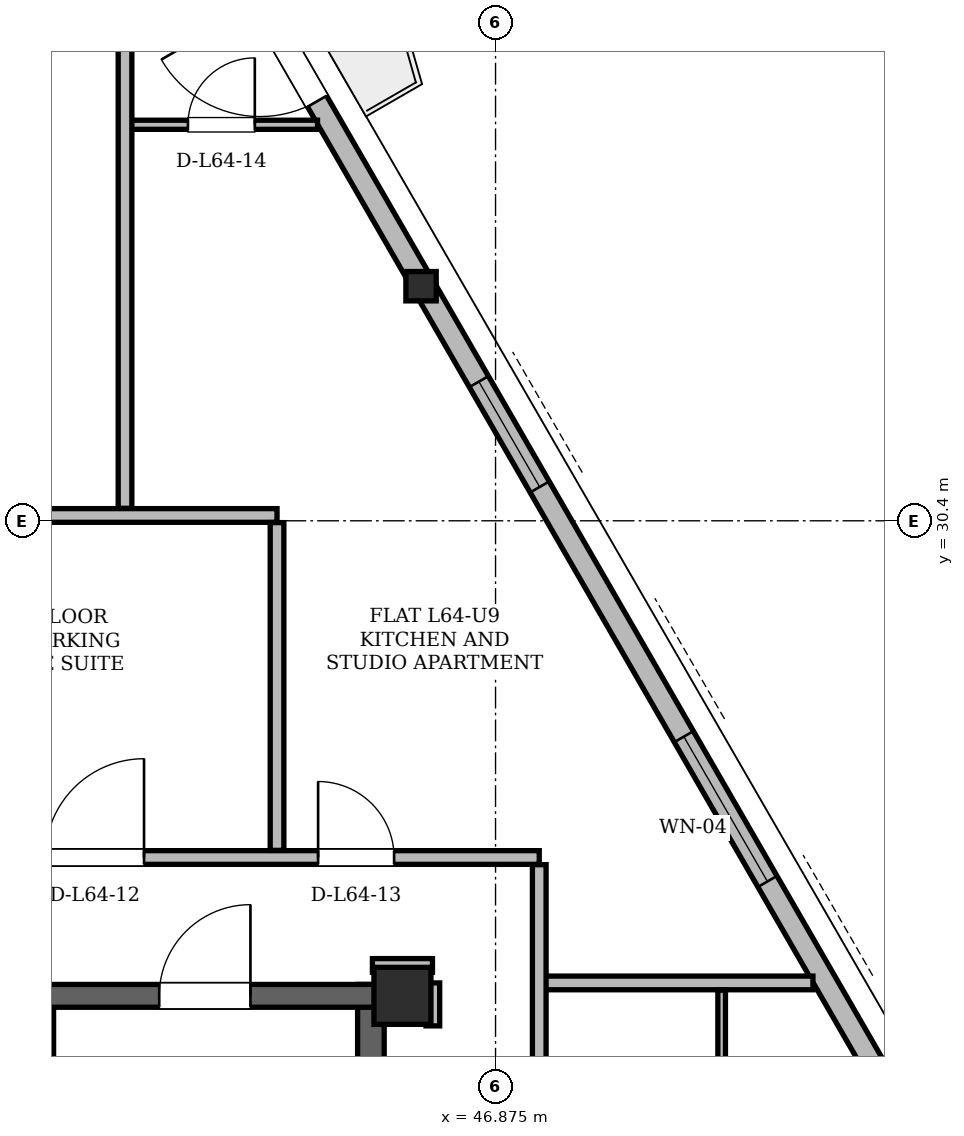
"""IFC4 building model, lengths in metres.
Left out: names, types, materials, properties, quantities, classifications, styles, units other than length and angle.
Written with IfcOpenShell. Run it as: python <this file> out.ifc"""

import sys

from ifc_helpers import new_model, si_unit, direction, frame, frame_2d, origin, origin_2d, place, context, subcontext, project, spatial, rectangle, hollow_rectangle, i_section, extrude, element, fill, save


model = new_model("IFC4")
c1 = context("Model", 3, precision=1e-05, world=origin(), true_north=direction((0.0, 1.0)))
c2 = subcontext(c1, "Body", "Model", "MODEL_VIEW")
j1 = project(units=[si_unit("LENGTHUNIT", "METRE"), si_unit("PLANEANGLEUNIT", "RADIAN")], contexts=[c1])
p1 = place(None, origin())
s1 = spatial("IfcSite", under=j1, at=p1, CompositionType="ELEMENT")
p2 = place(p1, origin())
s2 = spatial("IfcBuilding", under=s1, at=p2, CompositionType="ELEMENT")
p3 = place(p2, frame((0.0, 0.0, 241.5)))
s3 = spatial("IfcBuildingStorey", under=s2, at=p3, CompositionType="ELEMENT", Elevation=241.5)
p4 = place(p3, frame((45.65, 24.15, 0.0), z_axis=(0.0, 0.0, 1.0), x_axis=(1.0, 0.0, 0.0)))
e1 = element("IfcColumn", 1, at=p4, inside=s3, PredefinedType="COLUMN", context=c2, shape_type="SweptSolid", body=[
    extrude(hollow_rectangle(XDim=0.75, YDim=0.75, WallThickness=0.06, at=origin_2d()), origin(), (0.0, 0.0, 1.0), 3.6),
])
p5 = place(p3, frame((45.925, 33.498, 0.004), z_axis=(-0.016585869897, -0.006321663526, 0.999842460336), x_axis=(0.356154573909, -0.934427054127, 0.0)))
e2 = element("IfcColumn", 2, at=p5, inside=s3, PredefinedType="COLUMN", context=c2, shape_type="SweptSolid", body=[
    extrude(i_section(OverallWidth=0.399, OverallDepth=0.386, WebThickness=0.021, FlangeThickness=0.033, at=origin_2d()), origin(), (0.0, 0.0, 1.0), 3.592),
])
p6 = place(p3, frame((45.235, 11.0, 0.0), z_axis=(0.0, 0.0, 1.0), x_axis=(0.0, 1.0, 0.0)))
e3 = element("IfcWall", 3, at=p6, inside=s3, PredefinedType="SHEAR", context=c2, shape_type="SweptSolid", body=[
    extrude(rectangle(XDim=13.3, YDim=0.35, at=frame_2d((6.65, 0.0))), origin(), (0.0, 0.0, 1.0), 3.34),
])
p7 = place(p3, frame((29.65, 24.15, 0.0), z_axis=(0.0, 0.0, 1.0), x_axis=(1.0, 0.0, 0.0)))
e4 = element("IfcWall", 4, at=p7, inside=s3, PredefinedType="SHEAR", context=c2, shape_type="SweptSolid", body=[
    extrude(rectangle(XDim=15.7, YDim=0.3, at=frame_2d((7.85, 0.0))), origin(), (0.0, 0.0, 1.0), 3.34),
])
p8 = place(p7, frame((1.7, 0.0, 0.0)))
e5 = element("IfcOpeningElement", 5, at=p8, cuts=e4, PredefinedType="OPENING", context=c2, shape_type="SweptSolid", body=[
    extrude(rectangle(XDim=1.2, YDim=2.2, at=frame_2d((0.6, 1.1))), frame((0.0, 0.15, 0.0), z_axis=(0.0, -1.0, 0.0), x_axis=(1.0, 0.0, 0.0)), (0.0, 0.0, 1.0), 0.3),
])
p9 = place(p7, frame((12.8, 0.0, 0.0)))
e6 = element("IfcOpeningElement", 6, at=p9, cuts=e4, PredefinedType="OPENING", context=c2, shape_type="SweptSolid", body=[
    extrude(rectangle(XDim=1.2, YDim=2.2, at=frame_2d((0.6, 1.1))), frame((0.0, 0.15, 0.0), z_axis=(0.0, -1.0, 0.0), x_axis=(1.0, 0.0, 0.0)), (0.0, 0.0, 1.0), 0.3),
])
p10 = place(p7, frame((7.4, 0.0, 0.0)))
e7 = element("IfcOpeningElement", 7, at=p10, cuts=e4, PredefinedType="OPENING", context=c2, shape_type="SweptSolid", body=[
    extrude(rectangle(XDim=0.9, YDim=2.05, at=frame_2d((0.45, 1.025))), frame((0.0, 0.15, 0.0), z_axis=(0.0, -1.0, 0.0), x_axis=(1.0, 0.0, 0.0)), (0.0, 0.0, 1.0), 0.3),
])
p11 = place(p3, frame((58.857, 11.097, 0.0), z_axis=(0.0, 0.0, 1.0), x_axis=(-0.499999075663, 0.86602593745, 0.0)))
e8 = element("IfcWall", 8, at=p11, inside=s3, PredefinedType="SOLIDWALL", context=c2, shape_type="SweptSolid", body=[
    extrude(rectangle(XDim=36.951, YDim=0.29, at=frame_2d((18.476, 0.0))), origin(), (0.0, 0.0, 1.0), 2.637),
])
p12 = place(p11, frame((7.615, 0.0, 0.0)))
e9 = element("IfcOpeningElement", 9, at=p12, cuts=e8, PredefinedType="OPENING", context=c2, shape_type="SweptSolid", body=[
    extrude(rectangle(XDim=1.5, YDim=2.2, at=frame_2d((0.75, 1.1))), frame((0.0, 0.145, 0.0), z_axis=(0.0, -1.0, 0.0), x_axis=(1.0, 0.0, 0.0)), (0.0, 0.0, 1.0), 0.29),
])
p13 = place(p11, frame((28.662, 0.0, 0.0)))
e10 = element("IfcOpeningElement", 10, at=p13, cuts=e8, PredefinedType="OPENING", context=c2, shape_type="SweptSolid", body=[
    extrude(rectangle(XDim=1.5, YDim=2.2, at=frame_2d((0.75, 1.1))), frame((0.0, 0.145, 0.0), z_axis=(0.0, -1.0, 0.0), x_axis=(1.0, 0.0, 0.0)), (0.0, 0.0, 1.0), 0.29),
])
p14 = place(p11, frame((3.768, 0.0, 0.85)))
e11 = element("IfcOpeningElement", 11, at=p14, cuts=e8, PredefinedType="OPENING", context=c2, shape_type="SweptSolid", body=[
    extrude(rectangle(XDim=1.2, YDim=1.48, at=frame_2d((0.6, 0.74))), frame((0.0, 0.145, 0.0), z_axis=(0.0, -1.0, 0.0), x_axis=(1.0, 0.0, 0.0)), (0.0, 0.0, 1.0), 0.29),
])
p15 = place(p11, frame((1.122, 0.0, 0.85)))
e12 = element("IfcOpeningElement", 12, at=p15, cuts=e8, PredefinedType="OPENING", context=c2, shape_type="SweptSolid", body=[
    extrude(rectangle(XDim=1.6, YDim=1.677, at=frame_2d((0.8, 0.838))), frame((0.0, 0.145, 0.0), z_axis=(0.0, -1.0, 0.0), x_axis=(1.0, 0.0, 0.0)), (0.0, 0.0, 1.0), 0.29),
])
p16 = place(p11, frame((34.681, 0.0, 0.85)))
e13 = element("IfcOpeningElement", 13, at=p16, cuts=e8, PredefinedType="OPENING", context=c2, shape_type="SweptSolid", body=[
    extrude(rectangle(XDim=1.2, YDim=1.48, at=frame_2d((0.6, 0.74))), frame((0.0, 0.145, 0.0), z_axis=(0.0, -1.0, 0.0), x_axis=(1.0, 0.0, 0.0)), (0.0, 0.0, 1.0), 0.29),
])
p17 = place(p11, frame((16.81, 0.0, 0.85)))
e14 = element("IfcOpeningElement", 14, at=p17, cuts=e8, PredefinedType="OPENING", context=c2, shape_type="SweptSolid", body=[
    extrude(rectangle(XDim=2.2, YDim=1.677, at=frame_2d((1.1, 0.838))), frame((0.0, 0.145, 0.0), z_axis=(0.0, -1.0, 0.0), x_axis=(1.0, 0.0, 0.0)), (0.0, 0.0, 1.0), 0.29),
])
p18 = place(p11, frame((22.803, 0.0, 0.85)))
e15 = element("IfcOpeningElement", 15, at=p18, cuts=e8, PredefinedType="OPENING", context=c2, shape_type="SweptSolid", body=[
    extrude(rectangle(XDim=1.6, YDim=1.677, at=frame_2d((0.8, 0.838))), frame((0.0, 0.145, 0.0), z_axis=(0.0, -1.0, 0.0), x_axis=(1.0, 0.0, 0.0)), (0.0, 0.0, 1.0), 0.29),
])
p19 = place(p11, frame((9.478, 0.0, 0.85)))
e16 = element("IfcOpeningElement", 16, at=p19, cuts=e8, PredefinedType="OPENING", context=c2, shape_type="SweptSolid", body=[
    extrude(rectangle(XDim=1.2, YDim=1.48, at=frame_2d((0.6, 0.74))), frame((0.0, 0.145, 0.0), z_axis=(0.0, -1.0, 0.0), x_axis=(1.0, 0.0, 0.0)), (0.0, 0.0, 1.0), 0.29),
])
p20 = place(p3, frame((40.96, 19.48, 0.0), z_axis=(0.0, 0.0, 1.0), x_axis=(0.0, 1.0, 0.0)))
e17 = element("IfcWall", 17, at=p20, inside=s3, PredefinedType="PARTITIONING", context=c2, shape_type="SweptSolid", body=[
    extrude(rectangle(XDim=4.5, YDim=0.2, at=frame_2d((2.25, 0.0))), origin(), (0.0, 0.0, 1.0), 3.34),
])
p21 = place(p20, frame((2.12, 0.0, 0.0)))
e18 = element("IfcOpeningElement", 18, at=p21, cuts=e17, PredefinedType="OPENING", context=c2, shape_type="SweptSolid", body=[
    extrude(rectangle(XDim=1.1, YDim=2.2, at=frame_2d((0.55, 1.1))), frame((0.0, 0.1, 0.0), z_axis=(0.0, -1.0, 0.0), x_axis=(1.0, 0.0, 0.0)), (0.0, 0.0, 1.0), 0.2),
])
p22 = place(p3, frame((47.45, 24.32, 0.0), z_axis=(0.0, 0.0, 1.0), x_axis=(1.0, 0.0, 0.0)))
e19 = element("IfcWall", 19, at=p22, inside=s3, PredefinedType="PARTITIONING", context=c2, shape_type="SweptSolid", body=[
    extrude(rectangle(XDim=3.601, YDim=0.18, at=frame_2d((1.801, 0.0))), origin(), (0.0, 0.0, 1.0), 3.34),
])
p23 = place(p3, frame((45.255, 24.55, 0.0), z_axis=(0.0, 0.0, 1.0), x_axis=(1.0, 0.0, 0.0)))
e20 = element("IfcWall", 20, at=p23, inside=s3, PredefinedType="PARTITIONING", context=c2, shape_type="SweptSolid", body=[
    extrude(rectangle(XDim=0.79, YDim=0.18, at=frame_2d((0.395, 0.0))), origin(), (0.0, 0.0, 1.0), 2.873),
])
p24 = place(p3, frame((25.6, 25.97, 0.0), z_axis=(0.0, 0.0, 1.0), x_axis=(1.0, 0.0, 0.0)))
e21 = element("IfcWall", 21, at=p24, inside=s3, PredefinedType="PARTITIONING", context=c2, shape_type="SweptSolid", body=[
    extrude(rectangle(XDim=21.85, YDim=0.18, at=frame_2d((10.925, 0.0))), origin(), (0.0, 0.0, 1.0), 2.873),
])
p25 = place(p24, frame((3.87, 0.0, 0.0)))
e22 = element("IfcOpeningElement", 22, at=p25, cuts=e21, PredefinedType="OPENING", context=c2, shape_type="SweptSolid", body=[
    extrude(rectangle(XDim=1.0, YDim=2.18, at=frame_2d((0.5, 1.09))), frame((0.0, 0.09, 0.0), z_axis=(0.0, -1.0, 0.0), x_axis=(1.0, 0.0, 0.0)), (0.0, 0.0, 1.0), 0.18),
])
p26 = place(p24, frame((9.833, 0.0, 0.0)))
e23 = element("IfcOpeningElement", 23, at=p26, cuts=e21, PredefinedType="OPENING", context=c2, shape_type="SweptSolid", body=[
    extrude(rectangle(XDim=1.0, YDim=2.18, at=frame_2d((0.5, 1.09))), frame((0.0, 0.09, 0.0), z_axis=(0.0, -1.0, 0.0), x_axis=(1.0, 0.0, 0.0)), (0.0, 0.0, 1.0), 0.18),
])
p27 = place(p24, frame((15.35, 0.0, 0.0)))
e24 = element("IfcOpeningElement", 24, at=p27, cuts=e21, PredefinedType="OPENING", context=c2, shape_type="SweptSolid", body=[
    extrude(rectangle(XDim=1.3, YDim=2.2, at=frame_2d((0.65, 1.1))), frame((0.0, 0.09, 0.0), z_axis=(0.0, -1.0, 0.0), x_axis=(1.0, 0.0, 0.0)), (0.0, 0.0, 1.0), 0.18),
])
p28 = place(p24, frame((18.94, 0.0, 0.0)))
e25 = element("IfcOpeningElement", 25, at=p28, cuts=e21, PredefinedType="OPENING", context=c2, shape_type="SweptSolid", body=[
    extrude(rectangle(XDim=1.0, YDim=2.18, at=frame_2d((0.5, 1.09))), frame((0.0, 0.09, 0.0), z_axis=(0.0, -1.0, 0.0), x_axis=(1.0, 0.0, 0.0)), (0.0, 0.0, 1.0), 0.18),
])
p29 = place(p3, frame((39.2, 30.47, 0.0), z_axis=(0.0, 0.0, 1.0), x_axis=(1.0, 0.0, 0.0)))
e26 = element("IfcWall", 26, at=p29, inside=s3, PredefinedType="PARTITIONING", context=c2, shape_type="SweptSolid", body=[
    extrude(rectangle(XDim=4.8, YDim=0.18, at=frame_2d((2.4, 0.0))), origin(), (0.0, 0.0, 1.0), 2.873),
])
p30 = place(p3, frame((41.918, 35.61, 0.0), z_axis=(0.0, 0.0, 1.0), x_axis=(1.0, 0.0, 0.0)))
e27 = element("IfcWall", 27, at=p30, inside=s3, PredefinedType="PARTITIONING", context=c2, shape_type="SweptSolid", body=[
    extrude(rectangle(XDim=2.615, YDim=0.12, at=frame_2d((1.307, 0.0))), origin(), (0.0, 0.0, 1.0), 2.873),
])
p31 = place(p30, frame((0.91, 0.0, 0.0)))
e28 = element("IfcOpeningElement", 28, at=p31, cuts=e27, PredefinedType="OPENING", context=c2, shape_type="SweptSolid", body=[
    extrude(rectangle(XDim=0.88, YDim=2.08, at=frame_2d((0.44, 1.04))), frame((0.0, 0.06, 0.0), z_axis=(0.0, -1.0, 0.0), x_axis=(1.0, 0.0, 0.0)), (0.0, 0.0, 1.0), 0.12),
])
p32 = place(p3, frame((42.0, 30.564, 0.0), z_axis=(0.0, 0.0, 1.0), x_axis=(0.0, 1.0, 0.0)))
e29 = element("IfcWall", 29, at=p32, inside=s3, PredefinedType="PARTITIONING", context=c2, shape_type="SweptSolid", body=[
    extrude(rectangle(XDim=9.433, YDim=0.18, at=frame_2d((4.716, 0.0))), origin(), (0.0, 0.0, 1.0), 2.873),
])
p33 = place(p3, frame((44.0, 26.064, 0.0), z_axis=(0.0, 0.0, 1.0), x_axis=(0.0, 1.0, 0.0)))
e30 = element("IfcWall", 30, at=p33, inside=s3, PredefinedType="PARTITIONING", context=c2, shape_type="SweptSolid", body=[
    extrude(rectangle(XDim=4.312, YDim=0.18, at=frame_2d((2.156, 0.0))), origin(), (0.0, 0.0, 1.0), 2.873),
])
p34 = place(p3, frame((46.05, 23.755, 0.0), z_axis=(0.0, 0.0, 1.0), x_axis=(0.0, 1.0, 0.0)))
e31 = element("IfcWall", 31, at=p34, inside=s3, PredefinedType="PARTITIONING", context=c2, shape_type="SweptSolid", body=[
    extrude(rectangle(XDim=0.565, YDim=0.18, at=frame_2d((0.283, 0.0))), origin(), (0.0, 0.0, 1.0), 3.34),
])
p35 = place(p3, frame((47.45, 9.394, 0.0), z_axis=(0.0, 0.0, 1.0), x_axis=(0.0, 1.0, 0.0)))
e32 = element("IfcWall", 32, at=p35, inside=s3, PredefinedType="PARTITIONING", context=c2, shape_type="SweptSolid", body=[
    extrude(rectangle(XDim=16.482, YDim=0.18, at=frame_2d((8.241, 0.0))), origin(), (0.0, 0.0, 1.0), 2.873),
])
p36 = place(p35, frame((6.247, 0.0, 0.0)))
e33 = element("IfcOpeningElement", 33, at=p36, cuts=e32, PredefinedType="OPENING", context=c2, shape_type="SweptSolid", body=[
    extrude(rectangle(XDim=1.0, YDim=2.18, at=frame_2d((0.5, 1.09))), frame((0.0, 0.09, 0.0), z_axis=(0.0, -1.0, 0.0), x_axis=(1.0, 0.0, 0.0)), (0.0, 0.0, 1.0), 0.18),
])
p37 = place(p35, frame((10.379, 0.0, 0.0)))
e34 = element("IfcOpeningElement", 34, at=p37, cuts=e32, PredefinedType="OPENING", context=c2, shape_type="SweptSolid", body=[
    extrude(rectangle(XDim=1.0, YDim=2.18, at=frame_2d((0.5, 1.09))), frame((0.0, 0.09, 0.0), z_axis=(0.0, -1.0, 0.0), x_axis=(1.0, 0.0, 0.0)), (0.0, 0.0, 1.0), 0.18),
])
p38 = place(p3, frame((49.85, 21.974, 0.0), z_axis=(0.0, 0.0, 1.0), x_axis=(0.0, 1.0, 0.0)))
e35 = element("IfcWall", 35, at=p38, inside=s3, PredefinedType="PARTITIONING", context=c2, shape_type="SweptSolid", body=[
    extrude(rectangle(XDim=2.252, YDim=0.1, at=frame_2d((1.126, 0.0))), origin(), (0.0, 0.0, 1.0), 3.34),
])
p39 = place(p13, origin())
e36 = element("IfcDoor", 36, at=p39, inside=s3, OperationType="SINGLE_SWING_RIGHT", PredefinedType="DOOR", context=c2, shape_type="SweptSolid", body=[
    extrude(rectangle(XDim=1.5, YDim=2.2, at=frame_2d((0.75, 1.1))), frame((0.0, 0.025, 0.0), z_axis=(0.0, -1.0, 0.0), x_axis=(1.0, 0.0, 0.0)), (0.0, 0.0, 1.0), 0.05),
])
fill(e10, e36)
p40 = place(p17, origin())
e37 = element("IfcWindow", 37, at=p40, inside=s3, PartitioningType="SINGLE_PANEL", PredefinedType="WINDOW", context=c2, shape_type="SweptSolid", body=[
    extrude(rectangle(XDim=2.2, YDim=1.677, at=frame_2d((1.1, 0.838))), frame((0.0, 0.03, 0.0), z_axis=(0.0, -1.0, 0.0), x_axis=(1.0, 0.0, 0.0)), (0.0, 0.0, 1.0), 0.06),
])
fill(e14, e37)
p41 = place(p18, origin())
e38 = element("IfcWindow", 38, at=p41, inside=s3, PartitioningType="SINGLE_PANEL", PredefinedType="WINDOW", context=c2, shape_type="SweptSolid", body=[
    extrude(rectangle(XDim=1.6, YDim=1.677, at=frame_2d((0.8, 0.838))), frame((0.0, 0.03, 0.0), z_axis=(0.0, -1.0, 0.0), x_axis=(1.0, 0.0, 0.0)), (0.0, 0.0, 1.0), 0.06),
])
fill(e15, e38)
p42 = place(p9, origin())
e39 = element("IfcDoor", 39, at=p42, inside=s3, OperationType="SINGLE_SWING_RIGHT", PredefinedType="DOOR", context=c2, shape_type="SweptSolid", body=[
    extrude(rectangle(XDim=1.2, YDim=2.2, at=frame_2d((0.6, 1.1))), frame((0.0, 0.025, 0.0), z_axis=(0.0, -1.0, 0.0), x_axis=(1.0, 0.0, 0.0)), (0.0, 0.0, 1.0), 0.05),
])
fill(e6, e39)
p43 = place(p27, origin())
e40 = element("IfcDoor", 40, at=p43, inside=s3, OperationType="SINGLE_SWING_RIGHT", PredefinedType="DOOR", context=c2, shape_type="SweptSolid", body=[
    extrude(rectangle(XDim=1.3, YDim=2.2, at=frame_2d((0.65, 1.1))), frame((0.0, 0.025, 0.0), z_axis=(0.0, -1.0, 0.0), x_axis=(1.0, 0.0, 0.0)), (0.0, 0.0, 1.0), 0.05),
])
fill(e24, e40)
p44 = place(p28, origin())
e41 = element("IfcDoor", 41, at=p44, inside=s3, OperationType="SINGLE_SWING_LEFT", PredefinedType="DOOR", context=c2, shape_type="SweptSolid", body=[
    extrude(rectangle(XDim=1.0, YDim=2.18, at=frame_2d((0.5, 1.09))), frame((0.0, 0.025, 0.0), z_axis=(0.0, -1.0, 0.0), x_axis=(1.0, 0.0, 0.0)), (0.0, 0.0, 1.0), 0.05),
])
fill(e25, e41)
p45 = place(p31, origin())
e42 = element("IfcDoor", 42, at=p45, inside=s3, OperationType="SINGLE_SWING_RIGHT", PredefinedType="DOOR", context=c2, shape_type="SweptSolid", body=[
    extrude(rectangle(XDim=0.88, YDim=2.08, at=frame_2d((0.44, 1.04))), frame((0.0, 0.025, 0.0), z_axis=(0.0, -1.0, 0.0), x_axis=(1.0, 0.0, 0.0)), (0.0, 0.0, 1.0), 0.05),
])
fill(e28, e42)
save(model, sys.argv[1])
